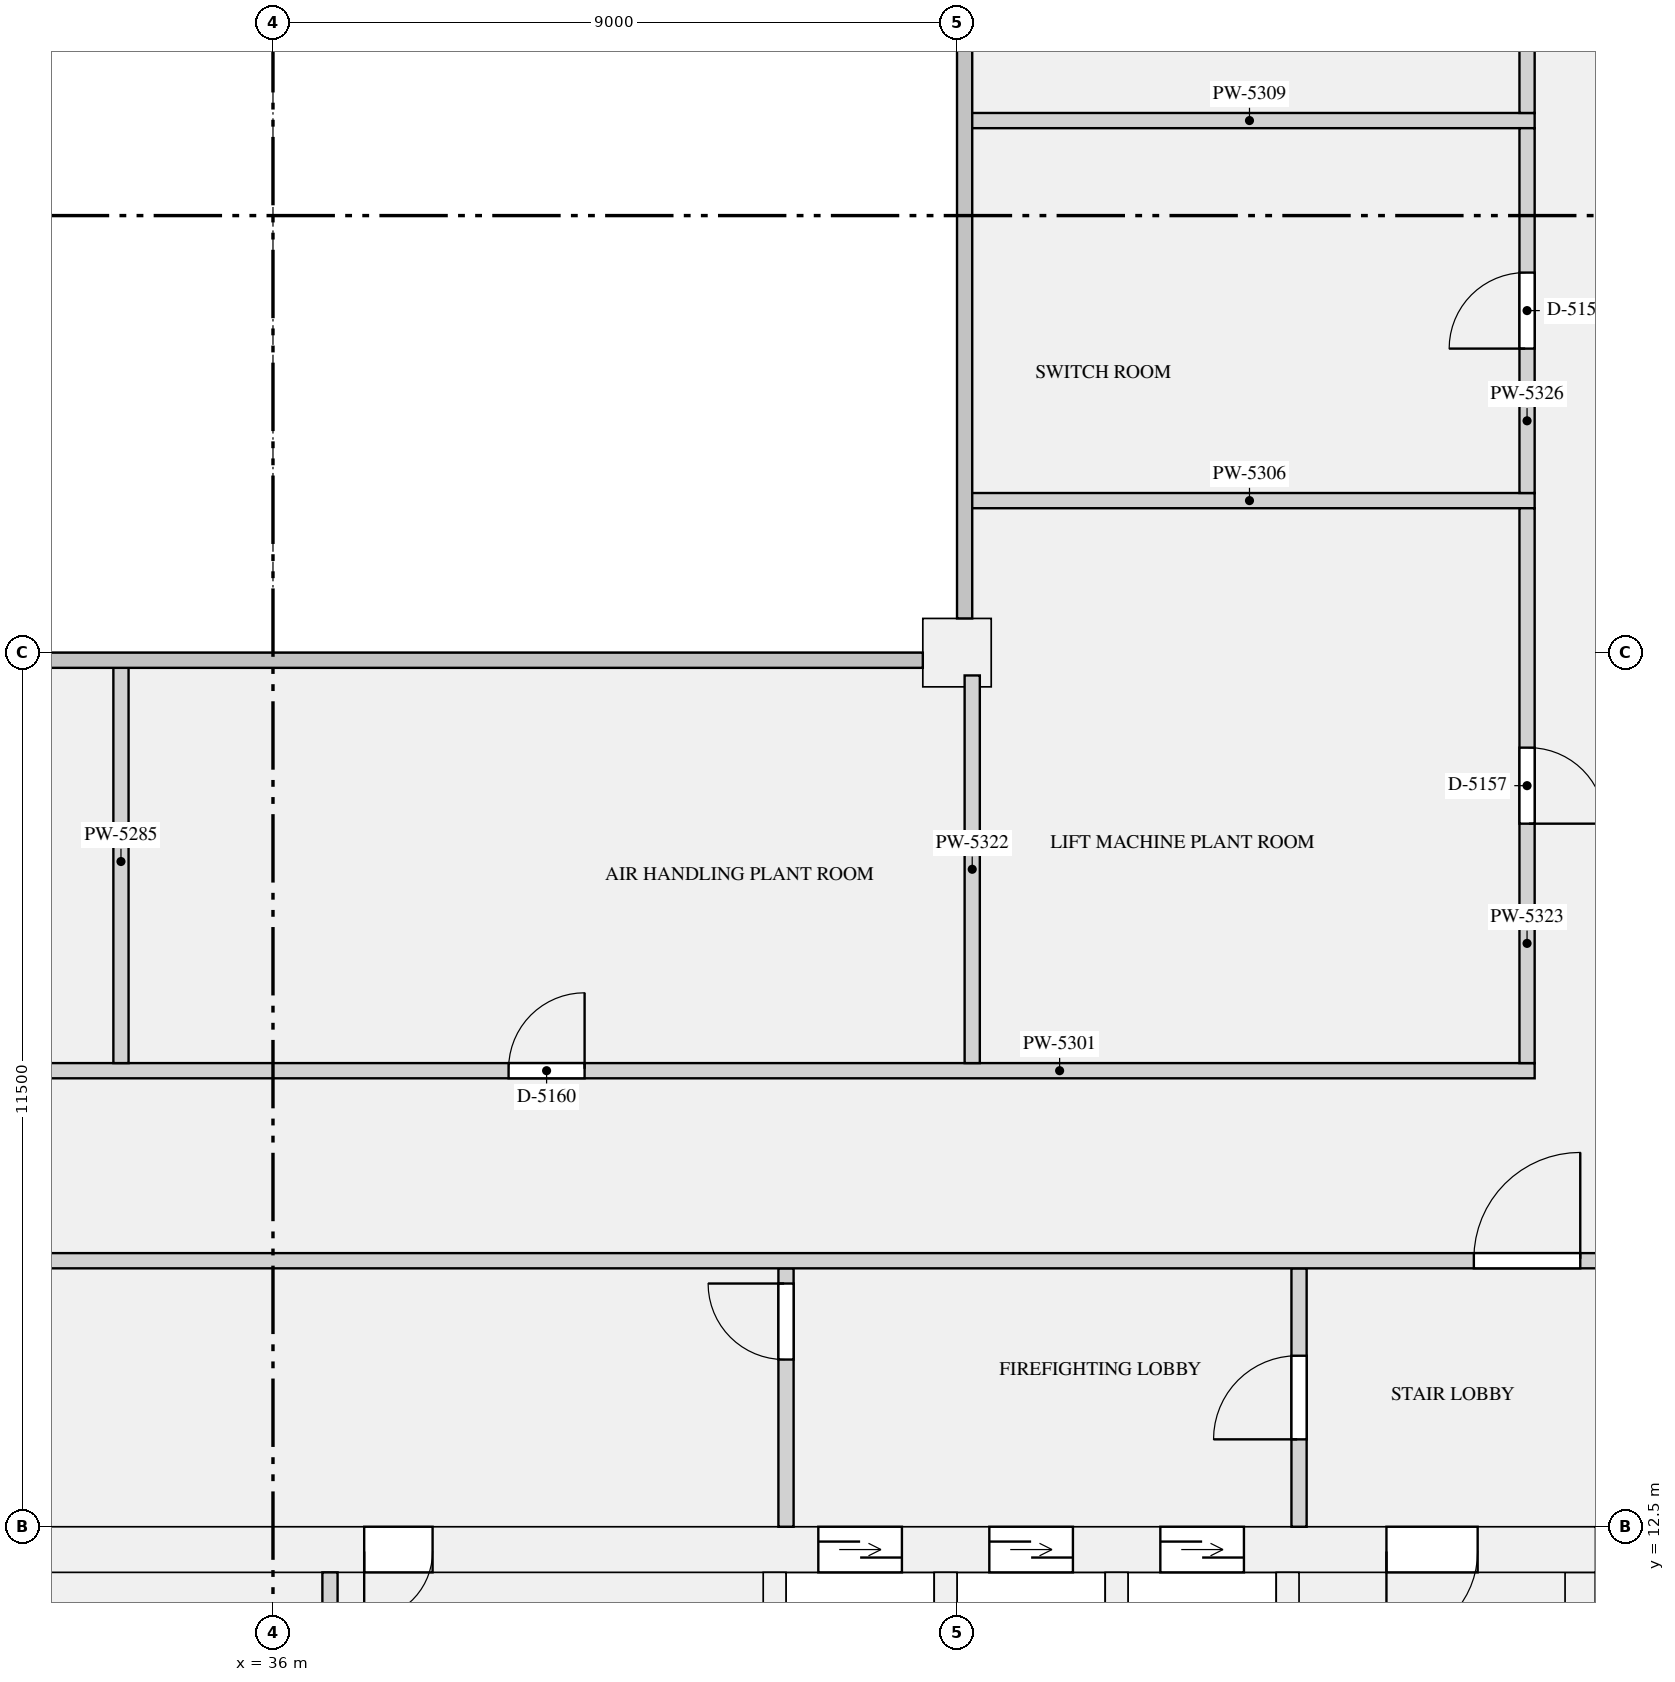
"""IFC4 building model, lengths in metres.
Left out: names, types, materials, properties, quantities, classifications, styles, units other than length and angle.
Written with IfcOpenShell. Run it as: python <this file> out.ifc"""

import sys

from ifc_helpers import new_model, si_unit, direction, frame, frame_2d, origin, origin_2d, place, context, subcontext, project, spatial, rectangle, extrude, element, fill, save


model = new_model("IFC4")
c1 = context("Model", 3, precision=1e-05, world=origin(), true_north=direction((0.0, 1.0)))
c2 = subcontext(c1, "Body", "Model", "MODEL_VIEW")
j1 = project(units=[si_unit("LENGTHUNIT", "METRE"), si_unit("PLANEANGLEUNIT", "RADIAN")], contexts=[c1])
p1 = place(None, origin())
s1 = spatial("IfcSite", under=j1, at=p1, CompositionType="ELEMENT")
p2 = place(p1, origin())
s2 = spatial("IfcBuilding", under=s1, at=p2, CompositionType="ELEMENT")
p3 = place(p2, frame((0.0, 0.0, 235.8)))
s3 = spatial("IfcBuildingStorey", under=s2, at=p3, CompositionType="ELEMENT", Elevation=235.8)
p4 = place(p3, frame((45.0, 24.0, 0.0), z_axis=(0.0, 0.0, 1.0), x_axis=(1.0, 0.0, 0.0)))
e1 = element("IfcColumn", 1, at=p4, inside=s3, PredefinedType="COLUMN", context=c2, shape_type="SweptSolid", body=[
    extrude(rectangle(XDim=0.9, YDim=0.9, at=origin_2d()), origin(), (0.0, 0.0, 1.0), 4.2),
])
p5 = place(p3, frame((18.6, 12.2, 0.0), z_axis=(0.0, 0.0, 1.0), x_axis=(1.0, 0.0, 0.0)))
e2 = element("IfcWall", 2, at=p5, inside=s3, PredefinedType="SHEAR", context=c2, shape_type="SweptSolid", body=[
    extrude(rectangle(XDim=34.8, YDim=0.6, at=frame_2d((17.4, 0.0))), origin(), (0.0, 0.0, 1.0), 4.2),
])
p6 = place(p5, frame((24.575, 0.0, 0.0)))
e3 = element("IfcOpeningElement", 3, at=p6, cuts=e2, PredefinedType="OPENING", context=c2, shape_type="SweptSolid", body=[
    extrude(rectangle(XDim=1.1, YDim=2.1, at=frame_2d((0.55, 1.05))), frame((0.0, 0.31, 0.0), z_axis=(0.0, -1.0, 0.0), x_axis=(1.0, 0.0, 0.0)), (0.0, 0.0, 1.0), 0.62),
])
p7 = place(p5, frame((26.825, 0.0, 0.0)))
e4 = element("IfcOpeningElement", 4, at=p7, cuts=e2, PredefinedType="OPENING", context=c2, shape_type="SweptSolid", body=[
    extrude(rectangle(XDim=1.1, YDim=2.1, at=frame_2d((0.55, 1.05))), frame((0.0, 0.31, 0.0), z_axis=(0.0, -1.0, 0.0), x_axis=(1.0, 0.0, 0.0)), (0.0, 0.0, 1.0), 0.62),
])
p8 = place(p5, frame((29.075, 0.0, 0.0)))
e5 = element("IfcOpeningElement", 5, at=p8, cuts=e2, PredefinedType="OPENING", context=c2, shape_type="SweptSolid", body=[
    extrude(rectangle(XDim=1.1, YDim=2.1, at=frame_2d((0.55, 1.05))), frame((0.0, 0.31, 0.0), z_axis=(0.0, -1.0, 0.0), x_axis=(1.0, 0.0, 0.0)), (0.0, 0.0, 1.0), 0.62),
])
p9 = place(p5, frame((18.6, 0.0, 0.0)))
e6 = element("IfcOpeningElement", 6, at=p9, cuts=e2, PredefinedType="OPENING", context=c2, shape_type="SweptSolid", body=[
    extrude(rectangle(XDim=0.9, YDim=2.1, at=frame_2d((0.45, 1.05))), frame((0.0, 0.31, 0.0), z_axis=(0.0, -1.0, 0.0), x_axis=(1.0, 0.0, 0.0)), (0.0, 0.0, 1.0), 0.62),
])
p10 = place(p5, frame((4.65, 0.0, 0.0)))
e7 = element("IfcOpeningElement", 7, at=p10, cuts=e2, PredefinedType="OPENING", context=c2, shape_type="SweptSolid", body=[
    extrude(rectangle(XDim=0.9, YDim=2.1, at=frame_2d((0.45, 1.05))), frame((0.0, 0.31, 0.0), z_axis=(0.0, -1.0, 0.0), x_axis=(1.0, 0.0, 0.0)), (0.0, 0.0, 1.0), 0.62),
])
p11 = place(p5, frame((1.55, 0.0, 0.0)))
e8 = element("IfcOpeningElement", 8, at=p11, cuts=e2, PredefinedType="OPENING", context=c2, shape_type="SweptSolid", body=[
    extrude(rectangle(XDim=1.2, YDim=2.1, at=frame_2d((0.6, 1.05))), frame((0.0, 0.31, 0.0), z_axis=(0.0, -1.0, 0.0), x_axis=(1.0, 0.0, 0.0)), (0.0, 0.0, 1.0), 0.62),
])
p12 = place(p5, frame((32.05, 0.0, 0.0)))
e9 = element("IfcOpeningElement", 9, at=p12, cuts=e2, PredefinedType="OPENING", context=c2, shape_type="SweptSolid", body=[
    extrude(rectangle(XDim=1.2, YDim=2.1, at=frame_2d((0.6, 1.05))), frame((0.0, 0.31, 0.0), z_axis=(0.0, -1.0, 0.0), x_axis=(1.0, 0.0, 0.0)), (0.0, 0.0, 1.0), 0.62),
])
p13 = place(p3, frame((53.2, 1.0, 0.0), z_axis=(0.0, 0.0, 1.0), x_axis=(0.0, 1.0, 0.0)))
e10 = element("IfcWall", 10, at=p13, inside=s3, PredefinedType="SHEAR", context=c2, shape_type="SweptSolid", body=[
    extrude(rectangle(XDim=10.9, YDim=0.4, at=frame_2d((5.45, 0.0))), origin(), (0.0, 0.0, 1.0), 4.2),
])
for number, where, z_axis, x_axis in (
    (11, (42.6, 8.25, 0.0), (0.0, 0.0, 1.0), (0.0, 1.0, 0.0)),
    (12, (44.85, 8.25, 0.0), (0.0, 0.0, 1.0), (0.0, 1.0, 0.0)),
    (13, (47.1, 8.25, 0.0), (0.0, 0.0, 1.0), (0.0, 1.0, 0.0)),
    (14, (49.35, 8.25, 0.0), (0.0, 0.0, 1.0), (0.0, 1.0, 0.0)),
):
    element("IfcWall", number, at=place(p3, frame(where, z_axis=z_axis, x_axis=x_axis)), inside=s3, PredefinedType="SHEAR", context=c2, shape_type="SweptSolid", body=[
        extrude(rectangle(XDim=3.65, YDim=0.3, at=frame_2d((1.825, 0.0))), origin(), (0.0, 0.0, 1.0), 4.2),
    ])
p14 = place(p3, frame((36.75, 9.75, 0.0), z_axis=(0.0, 0.0, 1.0), x_axis=(0.0, 1.0, 0.0)))
e15 = element("IfcWall", 15, at=p14, inside=s3, PredefinedType="PARTITIONING", context=c2, shape_type="SweptSolid", body=[
    extrude(rectangle(XDim=2.15, YDim=0.2, at=frame_2d((1.075, 0.0))), origin(), (0.0, 0.0, 1.0), 3.85),
])
p15 = place(p3, frame((42.75, 12.5, 0.0), z_axis=(0.0, 0.0, 1.0), x_axis=(0.0, 1.0, 0.0)))
e16 = element("IfcWall", 16, at=p15, inside=s3, PredefinedType="PARTITIONING", context=c2, shape_type="SweptSolid", body=[
    extrude(rectangle(XDim=3.4, YDim=0.2, at=frame_2d((1.7, 0.0))), origin(), (0.0, 0.0, 1.0), 3.85),
])
p16 = place(p15, frame((2.2, 0.0, 0.0)))
e17 = element("IfcOpeningElement", 17, at=p16, cuts=e16, PredefinedType="OPENING", context=c2, shape_type="SweptSolid", body=[
    extrude(rectangle(XDim=1.0, YDim=2.1, at=frame_2d((0.5, 1.05))), frame((0.0, 0.11, 0.0), z_axis=(0.0, -1.0, 0.0), x_axis=(1.0, 0.0, 0.0)), (0.0, 0.0, 1.0), 0.22),
])
p17 = place(p3, frame((49.5, 12.5, 0.0), z_axis=(0.0, 0.0, 1.0), x_axis=(0.0, 1.0, 0.0)))
e18 = element("IfcWall", 18, at=p17, inside=s3, PredefinedType="PARTITIONING", context=c2, shape_type="SweptSolid", body=[
    extrude(rectangle(XDim=3.4, YDim=0.2, at=frame_2d((1.7, 0.0))), origin(), (0.0, 0.0, 1.0), 3.85),
])
p18 = place(p17, frame((1.15, 0.0, 0.0)))
e19 = element("IfcOpeningElement", 19, at=p18, cuts=e18, PredefinedType="OPENING", context=c2, shape_type="SweptSolid", body=[
    extrude(rectangle(XDim=1.1, YDim=2.1, at=frame_2d((0.55, 1.05))), frame((0.0, 0.11, 0.0), z_axis=(0.0, -1.0, 0.0), x_axis=(1.0, 0.0, 0.0)), (0.0, 0.0, 1.0), 0.22),
])
p19 = place(p3, frame((17.9, 16.0, 0.0), z_axis=(0.0, 0.0, 1.0), x_axis=(1.0, 0.0, 0.0)))
e20 = element("IfcWall", 20, at=p19, inside=s3, PredefinedType="PARTITIONING", context=c2, shape_type="SweptSolid", body=[
    extrude(rectangle(XDim=36.2, YDim=0.2, at=frame_2d((18.1, 0.0))), origin(), (0.0, 0.0, 1.0), 3.85),
])
p20 = place(p19, frame((0.9, 0.0, 0.0)))
e21 = element("IfcOpeningElement", 21, at=p20, cuts=e20, PredefinedType="OPENING", context=c2, shape_type="SweptSolid", body=[
    extrude(rectangle(XDim=1.4, YDim=2.1, at=frame_2d((0.7, 1.05))), frame((0.0, 0.11, 0.0), z_axis=(0.0, -1.0, 0.0), x_axis=(1.0, 0.0, 0.0)), (0.0, 0.0, 1.0), 0.22),
])
p21 = place(p19, frame((33.9, 0.0, 0.0)))
e22 = element("IfcOpeningElement", 22, at=p21, cuts=e20, PredefinedType="OPENING", context=c2, shape_type="SweptSolid", body=[
    extrude(rectangle(XDim=1.4, YDim=2.1, at=frame_2d((0.7, 1.05))), frame((0.0, 0.11, 0.0), z_axis=(0.0, -1.0, 0.0), x_axis=(1.0, 0.0, 0.0)), (0.0, 0.0, 1.0), 0.22),
])
p22 = place(p3, frame((26.7, 18.5, 0.0), z_axis=(0.0, 0.0, 1.0), x_axis=(1.0, 0.0, 0.0)))
e23 = element("IfcWall", 23, at=p22, inside=s3, PredefinedType="PARTITIONING", context=c2, shape_type="SweptSolid", body=[
    extrude(rectangle(XDim=25.9, YDim=0.2, at=frame_2d((12.95, 0.0))), origin(), (0.0, 0.0, 1.0), 3.85),
])
p23 = place(p22, frame((3.2, 0.0, 0.0)))
e24 = element("IfcOpeningElement", 24, at=p23, cuts=e23, PredefinedType="OPENING", context=c2, shape_type="SweptSolid", body=[
    extrude(rectangle(XDim=1.0, YDim=2.1, at=frame_2d((0.5, 1.05))), frame((0.0, 0.11, 0.0), z_axis=(0.0, -1.0, 0.0), x_axis=(1.0, 0.0, 0.0)), (0.0, 0.0, 1.0), 0.22),
])
p24 = place(p22, frame((12.4, 0.0, 0.0)))
e25 = element("IfcOpeningElement", 25, at=p24, cuts=e23, PredefinedType="OPENING", context=c2, shape_type="SweptSolid", body=[
    extrude(rectangle(XDim=1.0, YDim=2.1, at=frame_2d((0.5, 1.05))), frame((0.0, 0.11, 0.0), z_axis=(0.0, -1.0, 0.0), x_axis=(1.0, 0.0, 0.0)), (0.0, 0.0, 1.0), 0.22),
])
for number, where, z_axis, x_axis in (
    (26, (45.096, 26.0, 0.0), (0.0, 0.0, 1.0), (1.0, 0.0, 0.0)),
    (27, (45.096, 31.0, 0.0), (0.0, 0.0, 1.0), (1.0, 0.0, 0.0)),
):
    element("IfcWall", number, at=place(p3, frame(where, z_axis=z_axis, x_axis=x_axis)), inside=s3, PredefinedType="PARTITIONING", context=c2, shape_type="SweptSolid", body=[
        extrude(rectangle(XDim=7.504, YDim=0.2, at=frame_2d((3.752, 0.0))), origin(), (0.0, 0.0, 1.0), 3.85),
    ])
p25 = place(p3, frame((34.0, 18.6, 0.0), z_axis=(0.0, 0.0, 1.0), x_axis=(0.0, 1.0, 0.0)))
e28 = element("IfcWall", 28, at=p25, inside=s3, PredefinedType="PARTITIONING", context=c2, shape_type="SweptSolid", body=[
    extrude(rectangle(XDim=5.304, YDim=0.2, at=frame_2d((2.652, 0.0))), origin(), (0.0, 0.0, 1.0), 3.85),
])
p26 = place(p3, frame((45.2, 18.6, 0.0), z_axis=(0.0, 0.0, 1.0), x_axis=(0.0, 1.0, 0.0)))
e29 = element("IfcWall", 29, at=p26, inside=s3, PredefinedType="PARTITIONING", context=c2, shape_type="SweptSolid", body=[
    extrude(rectangle(XDim=5.1, YDim=0.2, at=frame_2d((2.55, 0.0))), origin(), (0.0, 0.0, 1.0), 3.85),
])
p27 = place(p3, frame((52.5, 18.6, 0.0), z_axis=(0.0, 0.0, 1.0), x_axis=(0.0, 1.0, 0.0)))
e30 = element("IfcWall", 30, at=p27, inside=s3, PredefinedType="PARTITIONING", context=c2, shape_type="SweptSolid", body=[
    extrude(rectangle(XDim=7.3, YDim=0.2, at=frame_2d((3.65, 0.0))), origin(), (0.0, 0.0, 1.0), 3.85),
])
p28 = place(p27, frame((3.15, 0.0, 0.0)))
e31 = element("IfcOpeningElement", 31, at=p28, cuts=e30, PredefinedType="OPENING", context=c2, shape_type="SweptSolid", body=[
    extrude(rectangle(XDim=1.0, YDim=2.1, at=frame_2d((0.5, 1.05))), frame((0.0, 0.11, 0.0), z_axis=(0.0, -1.0, 0.0), x_axis=(1.0, 0.0, 0.0)), (0.0, 0.0, 1.0), 0.22),
])
p29 = place(p3, frame((52.5, 26.1, 0.0), z_axis=(0.0, 0.0, 1.0), x_axis=(0.0, 1.0, 0.0)))
e32 = element("IfcWall", 32, at=p29, inside=s3, PredefinedType="PARTITIONING", context=c2, shape_type="SweptSolid", body=[
    extrude(rectangle(XDim=4.8, YDim=0.2, at=frame_2d((2.4, 0.0))), origin(), (0.0, 0.0, 1.0), 3.85),
])
p30 = place(p29, frame((1.9, 0.0, 0.0)))
e33 = element("IfcOpeningElement", 33, at=p30, cuts=e32, PredefinedType="OPENING", context=c2, shape_type="SweptSolid", body=[
    extrude(rectangle(XDim=1.0, YDim=2.1, at=frame_2d((0.5, 1.05))), frame((0.0, 0.11, 0.0), z_axis=(0.0, -1.0, 0.0), x_axis=(1.0, 0.0, 0.0)), (0.0, 0.0, 1.0), 0.22),
])
p31 = place(p3, frame((52.5, 31.1, 0.0), z_axis=(0.0, 0.0, 1.0), x_axis=(0.0, 1.0, 0.0)))
e34 = element("IfcWall", 34, at=p31, inside=s3, PredefinedType="PARTITIONING", context=c2, shape_type="SweptSolid", body=[
    extrude(rectangle(XDim=4.7, YDim=0.2, at=frame_2d((2.35, 0.0))), origin(), (0.0, 0.0, 1.0), 3.85),
])
p32 = place(p31, frame((1.8, 0.0, 0.0)))
e35 = element("IfcOpeningElement", 35, at=p32, cuts=e34, PredefinedType="OPENING", context=c2, shape_type="SweptSolid", body=[
    extrude(rectangle(XDim=1.0, YDim=2.1, at=frame_2d((0.5, 1.05))), frame((0.0, 0.11, 0.0), z_axis=(0.0, -1.0, 0.0), x_axis=(1.0, 0.0, 0.0)), (0.0, 0.0, 1.0), 0.22),
])
p33 = place(p6, origin())
e36 = element("IfcDoor", 36, at=p33, inside=s3, OperationType="DOUBLE_DOOR_SLIDING", PredefinedType="DOOR", context=c2, shape_type="SweptSolid", body=[
    extrude(rectangle(XDim=1.1, YDim=2.1, at=frame_2d((0.55, 1.05))), frame((0.0, 0.025, 0.0), z_axis=(0.0, -1.0, 0.0), x_axis=(1.0, 0.0, 0.0)), (0.0, 0.0, 1.0), 0.05),
])
fill(e3, e36)
p34 = place(p7, origin())
e37 = element("IfcDoor", 37, at=p34, inside=s3, OperationType="DOUBLE_DOOR_SLIDING", PredefinedType="DOOR", context=c2, shape_type="SweptSolid", body=[
    extrude(rectangle(XDim=1.1, YDim=2.1, at=frame_2d((0.55, 1.05))), frame((0.0, 0.025, 0.0), z_axis=(0.0, -1.0, 0.0), x_axis=(1.0, 0.0, 0.0)), (0.0, 0.0, 1.0), 0.05),
])
fill(e4, e37)
p35 = place(p8, origin())
e38 = element("IfcDoor", 38, at=p35, inside=s3, OperationType="DOUBLE_DOOR_SLIDING", PredefinedType="DOOR", context=c2, shape_type="SweptSolid", body=[
    extrude(rectangle(XDim=1.1, YDim=2.1, at=frame_2d((0.55, 1.05))), frame((0.0, 0.025, 0.0), z_axis=(0.0, -1.0, 0.0), x_axis=(1.0, 0.0, 0.0)), (0.0, 0.0, 1.0), 0.05),
])
fill(e5, e38)
p36 = place(p9, frame((0.9, 0.0, 0.0), z_axis=(0.0, 0.0, 1.0), x_axis=(-1.0, 0.0, 0.0)))
e39 = element("IfcDoor", 39, at=p36, inside=s3, OperationType="SINGLE_SWING_RIGHT", PredefinedType="DOOR", context=c2, shape_type="SweptSolid", body=[
    extrude(rectangle(XDim=0.9, YDim=2.1, at=frame_2d((0.45, 1.05))), frame((0.0, 0.025, 0.0), z_axis=(0.0, -1.0, 0.0), x_axis=(1.0, 0.0, 0.0)), (0.0, 0.0, 1.0), 0.05),
])
fill(e6, e39)
p37 = place(p12, frame((1.2, 0.0, 0.0), z_axis=(0.0, 0.0, 1.0), x_axis=(-1.0, 0.0, 0.0)))
e40 = element("IfcDoor", 40, at=p37, inside=s3, OperationType="SINGLE_SWING_RIGHT", PredefinedType="DOOR", context=c2, shape_type="SweptSolid", body=[
    extrude(rectangle(XDim=1.2, YDim=2.1, at=frame_2d((0.6, 1.05))), frame((0.0, 0.025, 0.0), z_axis=(0.0, -1.0, 0.0), x_axis=(1.0, 0.0, 0.0)), (0.0, 0.0, 1.0), 0.05),
])
fill(e9, e40)
p38 = place(p16, origin())
e41 = element("IfcDoor", 41, at=p38, inside=s3, OperationType="SINGLE_SWING_RIGHT", PredefinedType="DOOR", context=c2, shape_type="SweptSolid", body=[
    extrude(rectangle(XDim=1.0, YDim=2.1, at=frame_2d((0.5, 1.05))), frame((0.0, 0.025, 0.0), z_axis=(0.0, -1.0, 0.0), x_axis=(1.0, 0.0, 0.0)), (0.0, 0.0, 1.0), 0.05),
])
fill(e17, e41)
p39 = place(p18, origin())
e42 = element("IfcDoor", 42, at=p39, inside=s3, OperationType="SINGLE_SWING_LEFT", PredefinedType="DOOR", context=c2, shape_type="SweptSolid", body=[
    extrude(rectangle(XDim=1.1, YDim=2.1, at=frame_2d((0.55, 1.05))), frame((0.0, 0.025, 0.0), z_axis=(0.0, -1.0, 0.0), x_axis=(1.0, 0.0, 0.0)), (0.0, 0.0, 1.0), 0.05),
])
fill(e19, e42)
p40 = place(p21, origin())
e43 = element("IfcDoor", 43, at=p40, inside=s3, OperationType="SINGLE_SWING_RIGHT", PredefinedType="DOOR", context=c2, shape_type="SweptSolid", body=[
    extrude(rectangle(XDim=1.4, YDim=2.1, at=frame_2d((0.7, 1.05))), frame((0.0, 0.025, 0.0), z_axis=(0.0, -1.0, 0.0), x_axis=(1.0, 0.0, 0.0)), (0.0, 0.0, 1.0), 0.05),
])
fill(e22, e43)
p41 = place(p28, frame((1.0, 0.0, 0.0), z_axis=(0.0, 0.0, 1.0), x_axis=(-1.0, 0.0, 0.0)))
e44 = element("IfcDoor", 44, at=p41, inside=s3, OperationType="SINGLE_SWING_RIGHT", PredefinedType="DOOR", context=c2, shape_type="SweptSolid", body=[
    extrude(rectangle(XDim=1.0, YDim=2.1, at=frame_2d((0.5, 1.05))), frame((0.0, 0.025, 0.0), z_axis=(0.0, -1.0, 0.0), x_axis=(1.0, 0.0, 0.0)), (0.0, 0.0, 1.0), 0.05),
])
fill(e31, e44)
p42 = place(p30, origin())
e45 = element("IfcDoor", 45, at=p42, inside=s3, OperationType="SINGLE_SWING_LEFT", PredefinedType="DOOR", context=c2, shape_type="SweptSolid", body=[
    extrude(rectangle(XDim=1.0, YDim=2.1, at=frame_2d((0.5, 1.05))), frame((0.0, 0.025, 0.0), z_axis=(0.0, -1.0, 0.0), x_axis=(1.0, 0.0, 0.0)), (0.0, 0.0, 1.0), 0.05),
])
fill(e33, e45)
p43 = place(p24, origin())
e46 = element("IfcDoor", 46, at=p43, inside=s3, OperationType="SINGLE_SWING_RIGHT", PredefinedType="DOOR", context=c2, shape_type="SweptSolid", body=[
    extrude(rectangle(XDim=1.0, YDim=2.1, at=frame_2d((0.5, 1.05))), frame((0.0, 0.025, 0.0), z_axis=(0.0, -1.0, 0.0), x_axis=(1.0, 0.0, 0.0)), (0.0, 0.0, 1.0), 0.05),
])
fill(e25, e46)
save(model, sys.argv[1])
